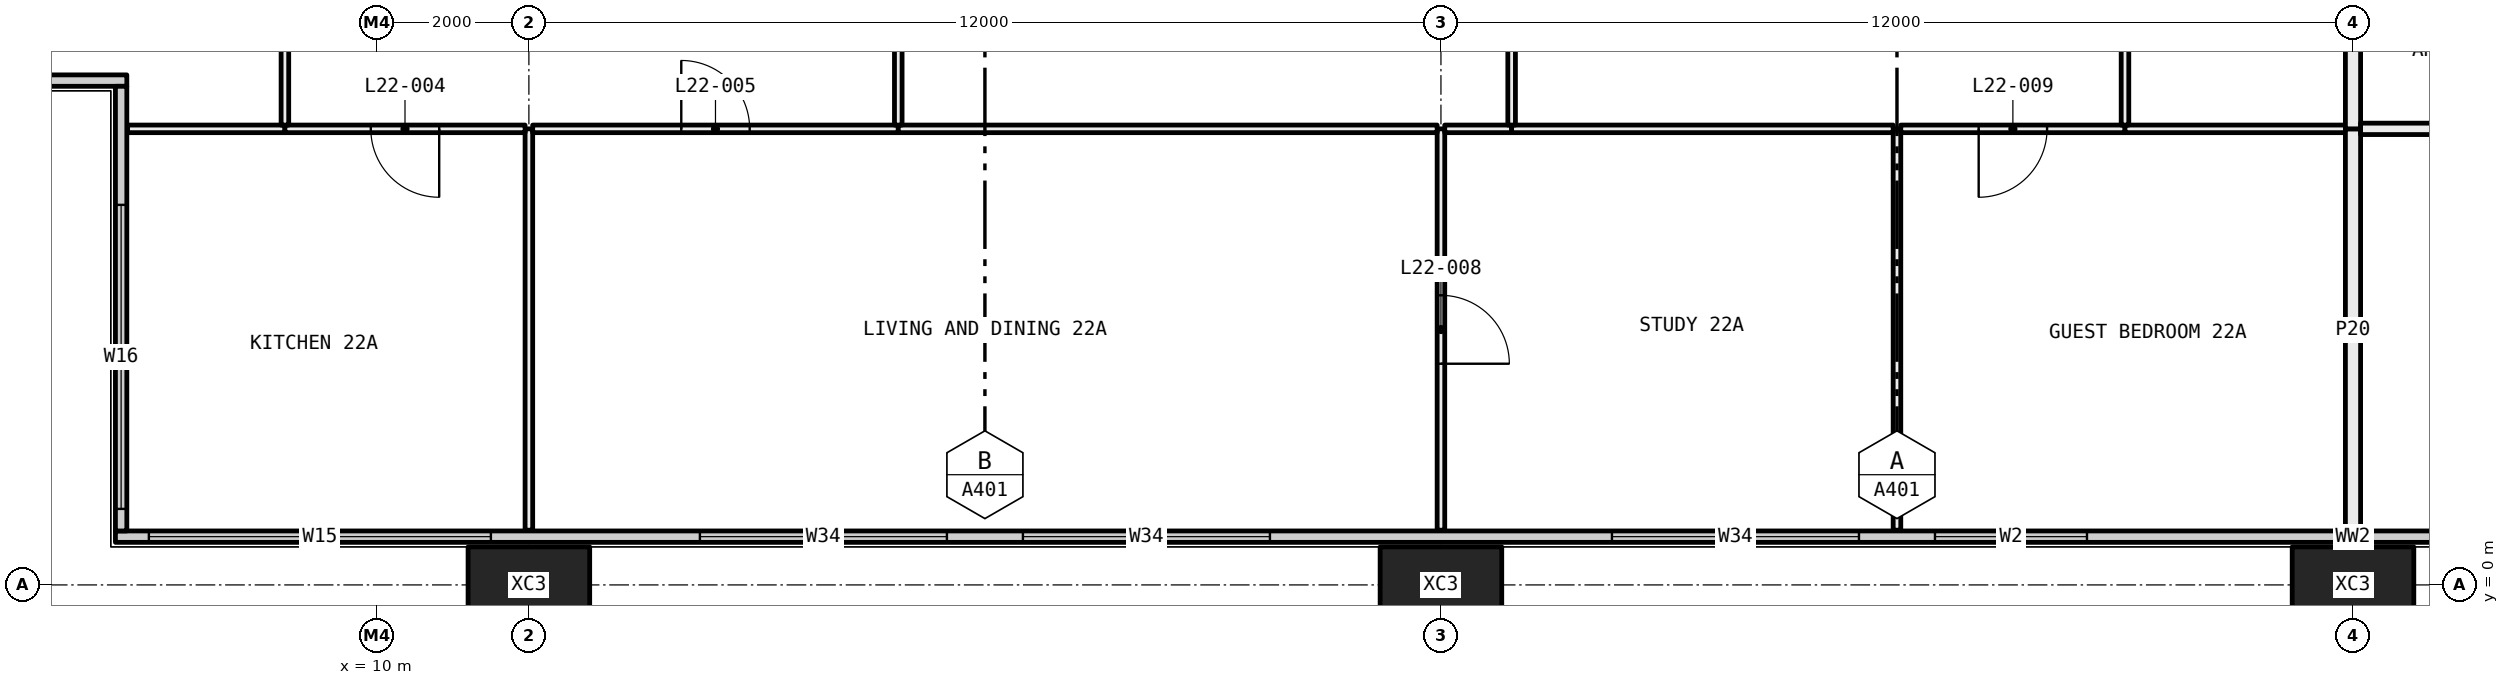
"""IFC4 building model, lengths in metres.
Left out: names, types, materials, properties, quantities, classifications, styles, units other than length and angle.
Written with IfcOpenShell. Run it as: python <this file> out.ifc"""

import sys

from ifc_helpers import new_model, si_unit, direction, frame, frame_2d, origin, origin_2d, place, context, subcontext, project, spatial, rectangle, hollow_rectangle, extrude, element, fill, save


model = new_model("IFC4")
c1 = context("Model", 3, precision=1e-05, world=origin(), true_north=direction((0.0, 1.0)))
c2 = subcontext(c1, "Body", "Model", "MODEL_VIEW")
j1 = project(units=[si_unit("LENGTHUNIT", "METRE"), si_unit("PLANEANGLEUNIT", "RADIAN")], contexts=[c1])
p1 = place(None, origin())
s1 = spatial("IfcSite", under=j1, at=p1, CompositionType="ELEMENT")
p2 = place(p1, origin())
s2 = spatial("IfcBuilding", under=s1, at=p2, CompositionType="ELEMENT")
p3 = place(p2, frame((0.0, 0.0, 88.65)))
s3 = spatial("IfcBuildingStorey", under=s2, at=p3, CompositionType="ELEMENT", Elevation=88.65)
for number, where, z_axis, x_axis in (
    (1, (12.0, 0.0, -0.4), (0.0, 0.0, 1.0), (1.0, 0.0, 0.0)),
    (2, (24.0, 0.0, -0.4), (0.0, 0.0, 1.0), (1.0, 0.0, 0.0)),
    (3, (36.0, 0.0, -0.4), (0.0, 0.0, 1.0), (1.0, 0.0, 0.0)),
):
    element("IfcColumn", number, at=place(p3, frame(where, z_axis=z_axis, x_axis=x_axis)), inside=s3, PredefinedType="COLUMN", context=c2, shape_type="SweptSolid", body=[
        extrude(hollow_rectangle(XDim=1.6, YDim=1.0, WallThickness=0.065, at=origin_2d()), origin(), (0.0, 0.0, 1.0), 3.45),
    ])
p4 = place(p3, frame((6.56, 0.635, 0.0), z_axis=(0.0, 0.0, 1.0), x_axis=(1.0, 0.0, 0.0)))
e4 = element("IfcWall", 4, at=p4, inside=s3, PredefinedType="ELEMENTEDWALL", context=c2, shape_type="SweptSolid", body=[
    extrude(rectangle(XDim=58.88, YDim=0.15, at=frame_2d((29.44, 0.0))), origin(), (0.0, 0.0, 1.0), 3.05),
])
p5 = place(p4, frame((0.44, 0.0, 0.45)))
e5 = element("IfcOpeningElement", 5, at=p5, cuts=e4, PredefinedType="OPENING", context=c2, shape_type="SweptSolid", body=[
    extrude(rectangle(XDim=4.5, YDim=2.55, at=frame_2d((2.25, 1.275))), frame((0.0, 0.085, 0.0), z_axis=(0.0, -1.0, 0.0), x_axis=(1.0, 0.0, 0.0)), (0.0, 0.0, 1.0), 0.17),
])
p6 = place(p4, frame((7.69, 0.0, 0.45)))
e6 = element("IfcOpeningElement", 6, at=p6, cuts=e4, PredefinedType="OPENING", context=c2, shape_type="SweptSolid", body=[
    extrude(rectangle(XDim=3.25, YDim=2.55, at=frame_2d((1.625, 1.275))), frame((0.0, 0.085, 0.0), z_axis=(0.0, -1.0, 0.0), x_axis=(1.0, 0.0, 0.0)), (0.0, 0.0, 1.0), 0.17),
])
p7 = place(p4, frame((11.94, 0.0, 0.45)))
e7 = element("IfcOpeningElement", 7, at=p7, cuts=e4, PredefinedType="OPENING", context=c2, shape_type="SweptSolid", body=[
    extrude(rectangle(XDim=3.25, YDim=2.55, at=frame_2d((1.625, 1.275))), frame((0.0, 0.085, 0.0), z_axis=(0.0, -1.0, 0.0), x_axis=(1.0, 0.0, 0.0)), (0.0, 0.0, 1.0), 0.17),
])
p8 = place(p4, frame((19.69, 0.0, 0.45)))
e8 = element("IfcOpeningElement", 8, at=p8, cuts=e4, PredefinedType="OPENING", context=c2, shape_type="SweptSolid", body=[
    extrude(rectangle(XDim=3.25, YDim=2.55, at=frame_2d((1.625, 1.275))), frame((0.0, 0.085, 0.0), z_axis=(0.0, -1.0, 0.0), x_axis=(1.0, 0.0, 0.0)), (0.0, 0.0, 1.0), 0.17),
])
p9 = place(p4, frame((23.94, 0.0, 0.45)))
e9 = element("IfcOpeningElement", 9, at=p9, cuts=e4, PredefinedType="OPENING", context=c2, shape_type="SweptSolid", body=[
    extrude(rectangle(XDim=2.0, YDim=2.55, at=frame_2d((1.0, 1.275))), frame((0.0, 0.085, 0.0), z_axis=(0.0, -1.0, 0.0), x_axis=(1.0, 0.0, 0.0)), (0.0, 0.0, 1.0), 0.17),
])
p10 = place(p4, frame((31.69, 0.0, 0.45)))
e10 = element("IfcOpeningElement", 10, at=p10, cuts=e4, PredefinedType="OPENING", context=c2, shape_type="SweptSolid", body=[
    extrude(rectangle(XDim=3.25, YDim=2.55, at=frame_2d((1.625, 1.275))), frame((0.0, 0.085, 0.0), z_axis=(0.0, -1.0, 0.0), x_axis=(1.0, 0.0, 0.0)), (0.0, 0.0, 1.0), 0.17),
])
p11 = place(p4, frame((35.94, 0.0, 0.45)))
e11 = element("IfcOpeningElement", 11, at=p11, cuts=e4, PredefinedType="OPENING", context=c2, shape_type="SweptSolid", body=[
    extrude(rectangle(XDim=3.25, YDim=2.55, at=frame_2d((1.625, 1.275))), frame((0.0, 0.085, 0.0), z_axis=(0.0, -1.0, 0.0), x_axis=(1.0, 0.0, 0.0)), (0.0, 0.0, 1.0), 0.17),
])
p12 = place(p4, frame((43.69, 0.0, 0.45)))
e12 = element("IfcOpeningElement", 12, at=p12, cuts=e4, PredefinedType="OPENING", context=c2, shape_type="SweptSolid", body=[
    extrude(rectangle(XDim=3.25, YDim=2.55, at=frame_2d((1.625, 1.275))), frame((0.0, 0.085, 0.0), z_axis=(0.0, -1.0, 0.0), x_axis=(1.0, 0.0, 0.0)), (0.0, 0.0, 1.0), 0.17),
])
p13 = place(p4, frame((47.94, 0.0, 0.45)))
e13 = element("IfcOpeningElement", 13, at=p13, cuts=e4, PredefinedType="OPENING", context=c2, shape_type="SweptSolid", body=[
    extrude(rectangle(XDim=2.0, YDim=2.55, at=frame_2d((1.0, 1.275))), frame((0.0, 0.085, 0.0), z_axis=(0.0, -1.0, 0.0), x_axis=(1.0, 0.0, 0.0)), (0.0, 0.0, 1.0), 0.17),
])
p14 = place(p4, frame((53.94, 0.0, 0.45)))
e14 = element("IfcOpeningElement", 14, at=p14, cuts=e4, PredefinedType="OPENING", context=c2, shape_type="SweptSolid", body=[
    extrude(rectangle(XDim=4.5, YDim=2.55, at=frame_2d((2.25, 1.275))), frame((0.0, 0.085, 0.0), z_axis=(0.0, -1.0, 0.0), x_axis=(1.0, 0.0, 0.0)), (0.0, 0.0, 1.0), 0.17),
])
p15 = place(p3, frame((0.56, 6.635, 0.0), z_axis=(0.0, 0.0, 1.0), x_axis=(1.0, 0.0, 0.0)))
e15 = element("IfcWall", 15, at=p15, inside=s3, PredefinedType="ELEMENTEDWALL", context=c2, shape_type="SweptSolid", body=[
    extrude(rectangle(XDim=6.15, YDim=0.15, at=frame_2d((3.075, 0.0))), origin(), (0.0, 0.0, 1.0), 3.05),
])
p16 = place(p15, frame((0.44, 0.0, 0.45)))
e16 = element("IfcOpeningElement", 16, at=p16, cuts=e15, PredefinedType="OPENING", context=c2, shape_type="SweptSolid", body=[
    extrude(rectangle(XDim=4.0, YDim=2.55, at=frame_2d((2.0, 1.275))), frame((0.0, 0.085, 0.0), z_axis=(0.0, -1.0, 0.0), x_axis=(1.0, 0.0, 0.0)), (0.0, 0.0, 1.0), 0.17),
])
p17 = place(p3, frame((6.635, 0.71, 0.0), z_axis=(0.0, 0.0, 1.0), x_axis=(0.0, 1.0, 0.0)))
e17 = element("IfcWall", 17, at=p17, inside=s3, PredefinedType="ELEMENTEDWALL", context=c2, shape_type="SweptSolid", body=[
    extrude(rectangle(XDim=5.85, YDim=0.15, at=frame_2d((2.925, 0.0))), origin(), (0.0, 0.0, 1.0), 3.05),
])
p18 = place(p17, frame((0.29, 0.0, 0.45)))
e18 = element("IfcOpeningElement", 18, at=p18, cuts=e17, PredefinedType="OPENING", context=c2, shape_type="SweptSolid", body=[
    extrude(rectangle(XDim=4.0, YDim=2.55, at=frame_2d((2.0, 1.275))), frame((0.0, 0.085, 0.0), z_axis=(0.0, -1.0, 0.0), x_axis=(1.0, 0.0, 0.0)), (0.0, 0.0, 1.0), 0.17),
])
p19 = place(p3, frame((12.0, 0.72, 0.0), z_axis=(0.0, 0.0, 1.0), x_axis=(0.0, 1.0, 0.0)))
e19 = element("IfcWall", 19, at=p19, inside=s3, PredefinedType="PARTITIONING", context=c2, shape_type="SweptSolid", body=[
    extrude(rectangle(XDim=5.28, YDim=0.1, at=frame_2d((2.64, 0.0))), origin(), (0.0, 0.0, 1.0), 2.45),
])
p20 = place(p3, frame((8.79, 6.0, 0.0), z_axis=(0.0, 0.0, 1.0), x_axis=(-1.0, 0.0, 0.0)))
e20 = element("IfcWall", 20, at=p20, inside=s3, PredefinedType="PARTITIONING", context=c2, shape_type="SweptSolid", body=[
    extrude(rectangle(XDim=2.07, YDim=0.1, at=frame_2d((1.035, 0.0))), origin(), (0.0, 0.0, 1.0), 3.05),
])
p21 = place(p3, frame((11.95, 6.0, 0.0), z_axis=(0.0, 0.0, 1.0), x_axis=(-1.0, 0.0, 0.0)))
e21 = element("IfcWall", 21, at=p21, inside=s3, PredefinedType="PARTITIONING", context=c2, shape_type="SweptSolid", body=[
    extrude(rectangle(XDim=3.16, YDim=0.1, at=frame_2d((1.58, 0.0))), origin(), (0.0, 0.0, 1.0), 2.45),
])
p22 = place(p21, frame((1.13, 0.0, 0.0)))
e22 = element("IfcOpeningElement", 22, at=p22, cuts=e21, PredefinedType="OPENING", context=c2, shape_type="SweptSolid", body=[
    extrude(rectangle(XDim=0.9, YDim=2.1, at=frame_2d((0.45, 1.05))), frame((0.0, 0.06, 0.0), z_axis=(0.0, -1.0, 0.0), x_axis=(1.0, 0.0, 0.0)), (0.0, 0.0, 1.0), 0.12),
])
p23 = place(p3, frame((24.0, 0.72, 0.0), z_axis=(0.0, 0.0, 1.0), x_axis=(0.0, 1.0, 0.0)))
e23 = element("IfcWall", 23, at=p23, inside=s3, PredefinedType="PARTITIONING", context=c2, shape_type="SweptSolid", body=[
    extrude(rectangle(XDim=5.28, YDim=0.1, at=frame_2d((2.64, 0.0))), origin(), (0.0, 0.0, 1.0), 2.45),
])
p24 = place(p23, frame((2.19, 0.0, 0.0)))
e24 = element("IfcOpeningElement", 24, at=p24, cuts=e23, PredefinedType="OPENING", context=c2, shape_type="SweptSolid", body=[
    extrude(rectangle(XDim=0.9, YDim=2.1, at=frame_2d((0.45, 1.05))), frame((0.0, 0.06, 0.0), z_axis=(0.0, -1.0, 0.0), x_axis=(1.0, 0.0, 0.0)), (0.0, 0.0, 1.0), 0.12),
])
p25 = place(p3, frame((16.86, 6.0, 0.0), z_axis=(0.0, 0.0, 1.0), x_axis=(-1.0, 0.0, 0.0)))
e25 = element("IfcWall", 25, at=p25, inside=s3, PredefinedType="PARTITIONING", context=c2, shape_type="SweptSolid", body=[
    extrude(rectangle(XDim=4.81, YDim=0.1, at=frame_2d((2.405, 0.0))), origin(), (0.0, 0.0, 1.0), 2.45),
])
p26 = place(p25, frame((1.955, 0.0, 0.0)))
e26 = element("IfcOpeningElement", 26, at=p26, cuts=e25, PredefinedType="OPENING", context=c2, shape_type="SweptSolid", body=[
    extrude(rectangle(XDim=0.9, YDim=2.1, at=frame_2d((0.45, 1.05))), frame((0.0, 0.06, 0.0), z_axis=(0.0, -1.0, 0.0), x_axis=(1.0, 0.0, 0.0)), (0.0, 0.0, 1.0), 0.12),
])
p27 = place(p3, frame((23.95, 6.0, 0.0), z_axis=(0.0, 0.0, 1.0), x_axis=(-1.0, 0.0, 0.0)))
e27 = element("IfcWall", 27, at=p27, inside=s3, PredefinedType="PARTITIONING", context=c2, shape_type="SweptSolid", body=[
    extrude(rectangle(XDim=7.09, YDim=0.1, at=frame_2d((3.545, 0.0))), origin(), (0.0, 0.0, 1.0), 2.45),
])
p28 = place(p3, frame((30.0, 0.72, 0.0), z_axis=(0.0, 0.0, 1.0), x_axis=(0.0, 1.0, 0.0)))
e28 = element("IfcWall", 28, at=p28, inside=s3, PredefinedType="PARTITIONING", context=c2, shape_type="SweptSolid", body=[
    extrude(rectangle(XDim=5.28, YDim=0.1, at=frame_2d((2.64, 0.0))), origin(), (0.0, 0.0, 1.0), 3.05),
])
p29 = place(p3, frame((24.93, 6.0, 0.0), z_axis=(0.0, 0.0, 1.0), x_axis=(-1.0, 0.0, 0.0)))
e29 = element("IfcWall", 29, at=p29, inside=s3, PredefinedType="PARTITIONING", context=c2, shape_type="SweptSolid", body=[
    extrude(rectangle(XDim=0.88, YDim=0.1, at=frame_2d((0.44, 0.0))), origin(), (0.0, 0.0, 1.0), 2.45),
])
p30 = place(p3, frame((29.95, 6.0, 0.0), z_axis=(0.0, 0.0, 1.0), x_axis=(-1.0, 0.0, 0.0)))
e30 = element("IfcWall", 30, at=p30, inside=s3, PredefinedType="PARTITIONING", context=c2, shape_type="SweptSolid", body=[
    extrude(rectangle(XDim=5.02, YDim=0.1, at=frame_2d((2.51, 0.0))), origin(), (0.0, 0.0, 1.0), 3.05),
])
p31 = place(p3, frame((33.0, 6.0, 0.0), z_axis=(0.0, 0.0, 1.0), x_axis=(-1.0, 0.0, 0.0)))
e31 = element("IfcWall", 31, at=p31, inside=s3, PredefinedType="PARTITIONING", context=c2, shape_type="SweptSolid", body=[
    extrude(rectangle(XDim=2.95, YDim=0.1, at=frame_2d((1.475, 0.0))), origin(), (0.0, 0.0, 1.0), 3.05),
])
p32 = place(p31, frame((1.025, 0.0, 0.0)))
e32 = element("IfcOpeningElement", 32, at=p32, cuts=e31, PredefinedType="OPENING", context=c2, shape_type="SweptSolid", body=[
    extrude(rectangle(XDim=0.9, YDim=2.1, at=frame_2d((0.45, 1.05))), frame((0.0, 0.06, 0.0), z_axis=(0.0, -1.0, 0.0), x_axis=(1.0, 0.0, 0.0)), (0.0, 0.0, 1.0), 0.12),
])
p33 = place(p3, frame((35.9, 6.0, 0.0), z_axis=(0.0, 0.0, 1.0), x_axis=(-1.0, 0.0, 0.0)))
e33 = element("IfcWall", 33, at=p33, inside=s3, PredefinedType="PARTITIONING", context=c2, shape_type="SweptSolid", body=[
    extrude(rectangle(XDim=2.9, YDim=0.1, at=frame_2d((1.45, 0.0))), origin(), (0.0, 0.0, 1.0), 3.05),
])
p34 = place(p3, frame((36.0, 0.72, 0.0), z_axis=(0.0, 0.0, 1.0), x_axis=(0.0, 1.0, 0.0)))
e34 = element("IfcWall", 34, at=p34, inside=s3, PredefinedType="PARTITIONING", context=c2, shape_type="SweptSolid", body=[
    extrude(rectangle(XDim=5.28, YDim=0.2, at=frame_2d((2.64, 0.0))), origin(), (0.0, 0.0, 1.0), 2.45),
])
p35 = place(p3, frame((8.79, 6.05, 0.0), z_axis=(0.0, 0.0, 1.0), x_axis=(0.0, 1.0, 0.0)))
e35 = element("IfcWall", 35, at=p35, inside=s3, PredefinedType="PARTITIONING", context=c2, shape_type="SweptSolid", body=[
    extrude(rectangle(XDim=5.95, YDim=0.1, at=frame_2d((2.975, 0.0))), origin(), (0.0, 0.0, 1.0), 2.45),
])
p36 = place(p35, frame((2.525, 0.0, 0.0)))
e36 = element("IfcOpeningElement", 36, at=p36, cuts=e35, PredefinedType="OPENING", context=c2, shape_type="SweptSolid", body=[
    extrude(rectangle(XDim=0.9, YDim=2.1, at=frame_2d((0.45, 1.05))), frame((0.0, 0.06, 0.0), z_axis=(0.0, -1.0, 0.0), x_axis=(1.0, 0.0, 0.0)), (0.0, 0.0, 1.0), 0.12),
])
p37 = place(p3, frame((16.86, 6.05, 0.0), z_axis=(0.0, 0.0, 1.0), x_axis=(0.0, 1.0, 0.0)))
e37 = element("IfcWall", 37, at=p37, inside=s3, PredefinedType="PARTITIONING", context=c2, shape_type="SweptSolid", body=[
    extrude(rectangle(XDim=5.95, YDim=0.1, at=frame_2d((2.975, 0.0))), origin(), (0.0, 0.0, 1.0), 2.45),
])
p38 = place(p3, frame((24.93, 6.05, 0.0), z_axis=(0.0, 0.0, 1.0), x_axis=(0.0, 1.0, 0.0)))
e38 = element("IfcWall", 38, at=p38, inside=s3, PredefinedType="PARTITIONING", context=c2, shape_type="SweptSolid", body=[
    extrude(rectangle(XDim=5.95, YDim=0.1, at=frame_2d((2.975, 0.0))), origin(), (0.0, 0.0, 1.0), 2.45),
])
p39 = place(p38, frame((2.525, 0.0, 0.0)))
e39 = element("IfcOpeningElement", 39, at=p39, cuts=e38, PredefinedType="OPENING", context=c2, shape_type="SweptSolid", body=[
    extrude(rectangle(XDim=0.9, YDim=2.1, at=frame_2d((0.45, 1.05))), frame((0.0, 0.06, 0.0), z_axis=(0.0, -1.0, 0.0), x_axis=(1.0, 0.0, 0.0)), (0.0, 0.0, 1.0), 0.12),
])
p40 = place(p3, frame((33.0, 6.05, 0.0), z_axis=(0.0, 0.0, 1.0), x_axis=(0.0, 1.0, 0.0)))
e40 = element("IfcWall", 40, at=p40, inside=s3, PredefinedType="PARTITIONING", context=c2, shape_type="SweptSolid", body=[
    extrude(rectangle(XDim=5.95, YDim=0.1, at=frame_2d((2.975, 0.0))), origin(), (0.0, 0.0, 1.0), 2.45),
])
p41 = place(p40, frame((2.525, 0.0, 0.0)))
e41 = element("IfcOpeningElement", 41, at=p41, cuts=e40, PredefinedType="OPENING", context=c2, shape_type="SweptSolid", body=[
    extrude(rectangle(XDim=0.9, YDim=2.1, at=frame_2d((0.45, 1.05))), frame((0.0, 0.06, 0.0), z_axis=(0.0, -1.0, 0.0), x_axis=(1.0, 0.0, 0.0)), (0.0, 0.0, 1.0), 0.12),
])
p42 = place(p3, frame((36.0, 6.0, 0.0), z_axis=(0.0, 0.0, 1.0), x_axis=(0.0, 1.0, 0.0)))
e42 = element("IfcWall", 42, at=p42, inside=s3, PredefinedType="PARTITIONING", context=c2, shape_type="SweptSolid", body=[
    extrude(rectangle(XDim=5.2, YDim=0.2, at=frame_2d((2.6, 0.0))), origin(), (0.0, 0.0, 1.0), 2.45),
])
p43 = place(p3, frame((39.0, 6.0, 0.0), z_axis=(0.0, 0.0, 1.0), x_axis=(-1.0, 0.0, 0.0)))
e43 = element("IfcWall", 43, at=p43, inside=s3, PredefinedType="PARTITIONING", context=c2, shape_type="SweptSolid", body=[
    extrude(rectangle(XDim=2.9, YDim=0.15, at=frame_2d((1.45, 0.0))), origin(), (0.0, 0.0, 1.0), 3.05),
])
p44 = place(p5, origin())
e44 = element("IfcWindow", 44, at=p44, inside=s3, PartitioningType="SINGLE_PANEL", PredefinedType="WINDOW", context=c2, shape_type="SweptSolid", body=[
    extrude(rectangle(XDim=4.5, YDim=2.55, at=frame_2d((2.25, 1.275))), frame((0.0, 0.03, 0.0), z_axis=(0.0, -1.0, 0.0), x_axis=(1.0, 0.0, 0.0)), (0.0, 0.0, 1.0), 0.06),
])
fill(e5, e44)
p45 = place(p6, origin())
e45 = element("IfcWindow", 45, at=p45, inside=s3, PartitioningType="SINGLE_PANEL", PredefinedType="WINDOW", context=c2, shape_type="SweptSolid", body=[
    extrude(rectangle(XDim=3.25, YDim=2.55, at=frame_2d((1.625, 1.275))), frame((0.0, 0.03, 0.0), z_axis=(0.0, -1.0, 0.0), x_axis=(1.0, 0.0, 0.0)), (0.0, 0.0, 1.0), 0.06),
])
fill(e6, e45)
p46 = place(p7, origin())
e46 = element("IfcWindow", 46, at=p46, inside=s3, PartitioningType="SINGLE_PANEL", PredefinedType="WINDOW", context=c2, shape_type="SweptSolid", body=[
    extrude(rectangle(XDim=3.25, YDim=2.55, at=frame_2d((1.625, 1.275))), frame((0.0, 0.03, 0.0), z_axis=(0.0, -1.0, 0.0), x_axis=(1.0, 0.0, 0.0)), (0.0, 0.0, 1.0), 0.06),
])
fill(e7, e46)
p47 = place(p8, origin())
e47 = element("IfcWindow", 47, at=p47, inside=s3, PartitioningType="SINGLE_PANEL", PredefinedType="WINDOW", context=c2, shape_type="SweptSolid", body=[
    extrude(rectangle(XDim=3.25, YDim=2.55, at=frame_2d((1.625, 1.275))), frame((0.0, 0.03, 0.0), z_axis=(0.0, -1.0, 0.0), x_axis=(1.0, 0.0, 0.0)), (0.0, 0.0, 1.0), 0.06),
])
fill(e8, e47)
p48 = place(p9, origin())
e48 = element("IfcWindow", 48, at=p48, inside=s3, PartitioningType="SINGLE_PANEL", PredefinedType="WINDOW", context=c2, shape_type="SweptSolid", body=[
    extrude(rectangle(XDim=2.0, YDim=2.55, at=frame_2d((1.0, 1.275))), frame((0.0, 0.03, 0.0), z_axis=(0.0, -1.0, 0.0), x_axis=(1.0, 0.0, 0.0)), (0.0, 0.0, 1.0), 0.06),
])
fill(e9, e48)
p49 = place(p18, origin())
e49 = element("IfcWindow", 49, at=p49, inside=s3, PartitioningType="SINGLE_PANEL", PredefinedType="WINDOW", context=c2, shape_type="SweptSolid", body=[
    extrude(rectangle(XDim=4.0, YDim=2.55, at=frame_2d((2.0, 1.275))), frame((0.0, 0.03, 0.0), z_axis=(0.0, -1.0, 0.0), x_axis=(1.0, 0.0, 0.0)), (0.0, 0.0, 1.0), 0.06),
])
fill(e18, e49)
p50 = place(p22, origin())
e50 = element("IfcDoor", 50, at=p50, inside=s3, OperationType="SINGLE_SWING_RIGHT", PredefinedType="DOOR", context=c2, shape_type="SweptSolid", body=[
    extrude(rectangle(XDim=0.9, YDim=2.1, at=frame_2d((0.45, 1.05))), frame((0.0, 0.025, 0.0), z_axis=(0.0, -1.0, 0.0), x_axis=(1.0, 0.0, 0.0)), (0.0, 0.0, 1.0), 0.05),
])
fill(e22, e50)
p51 = place(p26, frame((0.9, 0.0, 0.0), x_axis=(-1.0, 0.0, 0.0)))
e51 = element("IfcDoor", 51, at=p51, inside=s3, OperationType="SINGLE_SWING_RIGHT", PredefinedType="DOOR", context=c2, shape_type="SweptSolid", body=[
    extrude(rectangle(XDim=0.9, YDim=2.1, at=frame_2d((0.45, 1.05))), frame((0.0, 0.025, 0.0), z_axis=(0.0, -1.0, 0.0), x_axis=(1.0, 0.0, 0.0)), (0.0, 0.0, 1.0), 0.05),
])
fill(e26, e51)
p52 = place(p24, frame((0.9, 0.0, 0.0), x_axis=(-1.0, 0.0, 0.0)))
e52 = element("IfcDoor", 52, at=p52, inside=s3, OperationType="SINGLE_SWING_LEFT", PredefinedType="DOOR", context=c2, shape_type="SweptSolid", body=[
    extrude(rectangle(XDim=0.9, YDim=2.1, at=frame_2d((0.45, 1.05))), frame((0.0, 0.025, 0.0), z_axis=(0.0, -1.0, 0.0), x_axis=(1.0, 0.0, 0.0)), (0.0, 0.0, 1.0), 0.05),
])
fill(e24, e52)
p53 = place(p32, origin())
e53 = element("IfcDoor", 53, at=p53, inside=s3, OperationType="SINGLE_SWING_LEFT", PredefinedType="DOOR", context=c2, shape_type="SweptSolid", body=[
    extrude(rectangle(XDim=0.9, YDim=2.1, at=frame_2d((0.45, 1.05))), frame((0.0, 0.025, 0.0), z_axis=(0.0, -1.0, 0.0), x_axis=(1.0, 0.0, 0.0)), (0.0, 0.0, 1.0), 0.05),
])
fill(e32, e53)
save(model, sys.argv[1])
